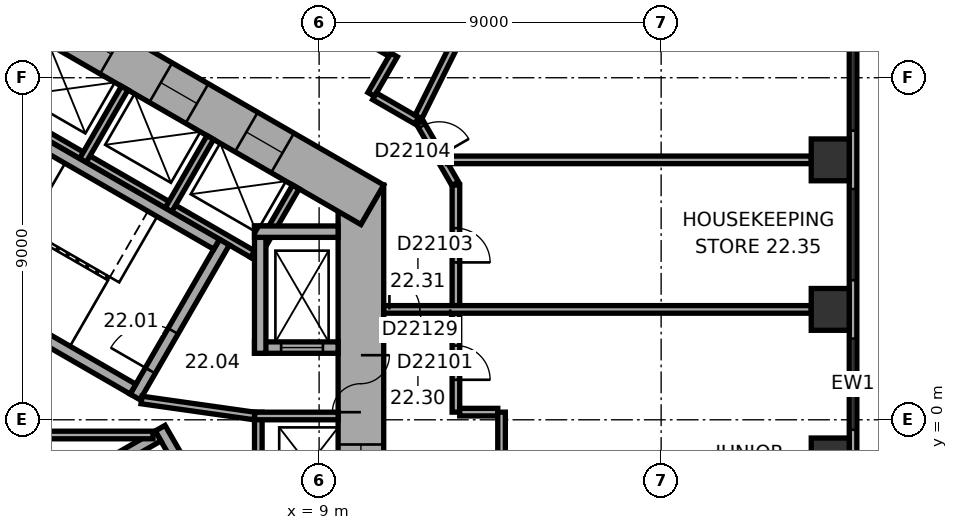
"""IFC4 building model, lengths in metres.
Left out: names, types, materials, properties, quantities, classifications, styles, units other than length and angle.
Written with IfcOpenShell. Run it as: python <this file> out.ifc"""

import sys

from ifc_helpers import new_model, si_unit, direction, frame, frame_2d, origin, origin_2d, place, context, subcontext, project, spatial, rectangle, extrude, element, fill, save


model = new_model("IFC4")
c1 = context("Model", 3, precision=1e-05, world=origin(), true_north=direction((0.0, 1.0)))
c2 = subcontext(c1, "Body", "Model", "MODEL_VIEW")
j1 = project(units=[si_unit("LENGTHUNIT", "METRE"), si_unit("PLANEANGLEUNIT", "RADIAN")], contexts=[c1])
p1 = place(None, origin())
s1 = spatial("IfcSite", under=j1, at=p1, CompositionType="ELEMENT")
p2 = place(p1, origin())
s2 = spatial("IfcBuilding", under=s1, at=p2, CompositionType="ELEMENT")
p3 = place(p2, frame((0.0, 0.0, 96.8)))
s3 = spatial("IfcBuildingStorey", under=s2, at=p3, CompositionType="ELEMENT", Elevation=96.8)
for number, where, z_axis, x_axis in (
    (1, (22.45, -1.03, 0.0), (0.0, 0.0, 1.0), (0.0, 1.0, 0.0)),
    (2, (22.45, 2.905, 0.0), (0.0, 0.0, 1.0), (0.0, 1.0, 0.0)),
    (3, (22.45, 6.839, 0.0), (0.0, 0.0, 1.0), (0.0, 1.0, 0.0)),
):
    element("IfcColumn", number, at=place(p3, frame(where, z_axis=z_axis, x_axis=x_axis)), inside=s3, PredefinedType="COLUMN", context=c2, shape_type="SweptSolid", body=[
        extrude(rectangle(XDim=1.1, YDim=1.0, at=origin_2d()), origin(), (0.0, 0.0, 1.0), 3.3),
    ])
p4 = place(p3, frame((10.1, -6.177, 0.0), z_axis=(0.0, 0.0, 1.0), x_axis=(0.0, 1.0, 0.0)))
e4 = element("IfcWall", 4, at=p4, inside=s3, PredefinedType="SHEAR", context=c2, shape_type="SweptSolid", body=[
    extrude(rectangle(XDim=12.355, YDim=1.2, at=frame_2d((6.177, 0.0))), origin(), (0.0, 0.0, 1.0), 3.3),
])
p5 = place(p4, frame((6.378, 0.0, 0.0)))
e5 = element("IfcOpeningElement", 5, at=p5, cuts=e4, PredefinedType="OPENING", context=c2, shape_type="SweptSolid", body=[
    extrude(rectangle(XDim=1.5, YDim=2.1, at=frame_2d((0.75, 1.05))), frame((0.0, 0.61, 0.0), z_axis=(0.0, -1.0, 0.0), x_axis=(1.0, 0.0, 0.0)), (0.0, 0.0, 1.0), 1.22),
])
p6 = place(p4, frame((1.828, 0.0, 0.0)))
e6 = element("IfcOpeningElement", 6, at=p6, cuts=e4, PredefinedType="OPENING", context=c2, shape_type="SweptSolid", body=[
    extrude(rectangle(XDim=1.1, YDim=2.1, at=frame_2d((0.55, 1.05))), frame((0.0, 0.61, 0.0), z_axis=(0.0, -1.0, 0.0), x_axis=(1.0, 0.0, 0.0)), (0.0, 0.0, 1.0), 1.22),
])
p7 = place(p4, frame((4.427, 0.0, 0.0)))
e7 = element("IfcOpeningElement", 7, at=p7, cuts=e4, PredefinedType="OPENING", context=c2, shape_type="SweptSolid", body=[
    extrude(rectangle(XDim=1.1, YDim=2.1, at=frame_2d((0.55, 1.05))), frame((0.0, 0.61, 0.0), z_axis=(0.0, -1.0, 0.0), x_axis=(1.0, 0.0, 0.0)), (0.0, 0.0, 1.0), 1.22),
])
p8 = place(p3, frame((10.4, 5.658, 0.0), z_axis=(0.0, 0.0, 1.0), x_axis=(-0.866021384402, 0.500006961711, 0.0)))
e8 = element("IfcWall", 8, at=p8, inside=s3, PredefinedType="SHEAR", context=c2, shape_type="SweptSolid", body=[
    extrude(rectangle(XDim=12.355, YDim=1.2, at=frame_2d((6.178, 0.0))), origin(), (0.0, 0.0, 1.0), 3.3),
])
p9 = place(p8, frame((2.728, 0.0, 0.0)))
e9 = element("IfcOpeningElement", 9, at=p9, cuts=e8, PredefinedType="OPENING", context=c2, shape_type="SweptSolid", body=[
    extrude(rectangle(XDim=1.1, YDim=2.1, at=frame_2d((0.55, 1.05))), frame((0.0, 0.61, 0.0), z_axis=(0.0, -1.0, 0.0), x_axis=(1.0, 0.0, 0.0)), (0.0, 0.0, 1.0), 1.22),
])
p10 = place(p8, frame((5.328, 0.0, 0.0)))
e10 = element("IfcOpeningElement", 10, at=p10, cuts=e8, PredefinedType="OPENING", context=c2, shape_type="SweptSolid", body=[
    extrude(rectangle(XDim=1.1, YDim=2.1, at=frame_2d((0.55, 1.05))), frame((0.0, 0.61, 0.0), z_axis=(0.0, -1.0, 0.0), x_axis=(1.0, 0.0, 0.0)), (0.0, 0.0, 1.0), 1.22),
])
p11 = place(p8, frame((7.928, 0.0, 0.0)))
e11 = element("IfcOpeningElement", 11, at=p11, cuts=e8, PredefinedType="OPENING", context=c2, shape_type="SweptSolid", body=[
    extrude(rectangle(XDim=1.1, YDim=2.1, at=frame_2d((0.55, 1.05))), frame((0.0, 0.61, 0.0), z_axis=(0.0, -1.0, 0.0), x_axis=(1.0, 0.0, 0.0)), (0.0, 0.0, 1.0), 1.22),
])
p12 = place(p3, frame((23.05, -9.687, 0.0), z_axis=(0.0, 0.0, 1.0), x_axis=(0.0, 1.0, 0.0)))
e12 = element("IfcWall", 12, at=p12, inside=s3, PredefinedType="STANDARD", context=c2, shape_type="SweptSolid", body=[
    extrude(rectangle(XDim=21.246, YDim=0.2, at=frame_2d((10.623, 0.0))), origin(), (0.0, 0.0, 1.0), 3.3),
])
p13 = place(p12, frame((1.555, 0.0, 0.8)))
e13 = element("IfcOpeningElement", 13, at=p13, cuts=e12, PredefinedType="OPENING", context=c2, shape_type="SweptSolid", body=[
    extrude(rectangle(XDim=2.4, YDim=1.7, at=frame_2d((1.2, 0.85))), frame((0.0, 0.11, 0.0), z_axis=(0.0, -1.0, 0.0), x_axis=(1.0, 0.0, 0.0)), (0.0, 0.0, 1.0), 0.22),
])
p14 = place(p12, frame((5.489, 0.0, 0.8)))
e14 = element("IfcOpeningElement", 14, at=p14, cuts=e12, PredefinedType="OPENING", context=c2, shape_type="SweptSolid", body=[
    extrude(rectangle(XDim=2.4, YDim=1.7, at=frame_2d((1.2, 0.85))), frame((0.0, 0.11, 0.0), z_axis=(0.0, -1.0, 0.0), x_axis=(1.0, 0.0, 0.0)), (0.0, 0.0, 1.0), 0.22),
])
p15 = place(p12, frame((9.424, 0.0, 0.8)))
e15 = element("IfcOpeningElement", 15, at=p15, cuts=e12, PredefinedType="OPENING", context=c2, shape_type="SweptSolid", body=[
    extrude(rectangle(XDim=2.4, YDim=1.7, at=frame_2d((1.2, 0.85))), frame((0.0, 0.11, 0.0), z_axis=(0.0, -1.0, 0.0), x_axis=(1.0, 0.0, 0.0)), (0.0, 0.0, 1.0), 0.22),
])
p16 = place(p12, frame((13.358, 0.0, 0.8)))
e16 = element("IfcOpeningElement", 16, at=p16, cuts=e12, PredefinedType="OPENING", context=c2, shape_type="SweptSolid", body=[
    extrude(rectangle(XDim=2.4, YDim=1.7, at=frame_2d((1.2, 0.85))), frame((0.0, 0.11, 0.0), z_axis=(0.0, -1.0, 0.0), x_axis=(1.0, 0.0, 0.0)), (0.0, 0.0, 1.0), 0.22),
])
p17 = place(p12, frame((17.293, 0.0, 0.8)))
e17 = element("IfcOpeningElement", 17, at=p17, cuts=e12, PredefinedType="OPENING", context=c2, shape_type="SweptSolid", body=[
    extrude(rectangle(XDim=2.4, YDim=1.7, at=frame_2d((1.2, 0.85))), frame((0.0, 0.11, 0.0), z_axis=(0.0, -1.0, 0.0), x_axis=(1.0, 0.0, 0.0)), (0.0, 0.0, 1.0), 0.22),
])
p18 = place(p3, frame((7.4, -5.2, 0.0), z_axis=(0.0, 0.0, 1.0), x_axis=(0.0, 1.0, 0.0)))
e18 = element("IfcWall", 18, at=p18, inside=s3, PredefinedType="PARTITIONING", context=c2, shape_type="SweptSolid", body=[
    extrude(rectangle(XDim=5.4, YDim=0.2, at=frame_2d((2.7, 0.0))), origin(), (0.0, 0.0, 1.0), 3.05),
])
p19 = place(p3, frame((7.3, 0.1, 0.0), z_axis=(0.0, 0.0, 1.0), x_axis=(1.0, 0.0, 0.0)))
e19 = element("IfcWall", 19, at=p19, inside=s3, PredefinedType="PARTITIONING", context=c2, shape_type="SweptSolid", body=[
    extrude(rectangle(XDim=2.2, YDim=0.2, at=frame_2d((1.1, 0.0))), origin(), (0.0, 0.0, 1.0), 3.05),
])
p20 = place(p3, frame((7.424, 4.259, 0.0), z_axis=(0.0, 0.0, 1.0), x_axis=(-0.866026010844, 0.49999894854, 0.0)))
e20 = element("IfcWall", 20, at=p20, inside=s3, PredefinedType="PARTITIONING", context=c2, shape_type="SweptSolid", body=[
    extrude(rectangle(XDim=8.0, YDim=0.2, at=frame_2d((4.0, 0.0))), origin(), (0.0, 0.0, 1.0), 3.05),
])
for number, where, z_axis, x_axis in (
    (21, (7.287, 4.222, 0.0), (0.0, 0.0, 1.0), (0.5, 0.866, 0.0)),
    (22, (5.036, 5.522, 0.0), (0.0, 0.0, 1.0), (0.5, 0.866, 0.0)),
    (23, (2.784, 6.822, 0.0), (0.0, 0.0, 1.0), (0.5, 0.866, 0.0)),
):
    element("IfcWall", number, at=place(p3, frame(where, z_axis=z_axis, x_axis=x_axis)), inside=s3, PredefinedType="PARTITIONING", context=c2, shape_type="SweptSolid", body=[
        extrude(rectangle(XDim=2.2, YDim=0.2, at=frame_2d((1.1, 0.0))), origin(), (0.0, 0.0, 1.0), 3.05),
    ])
p21 = place(p3, frame((4.158, 0.602, 0.0), z_axis=(0.0, 0.0, 1.0), x_axis=(0.499977259774, 0.866038532462, 0.0)))
e24 = element("IfcWall", 24, at=p21, inside=s3, PredefinedType="SHEAR", context=c2, shape_type="SweptSolid", body=[
    extrude(rectangle(XDim=4.7, YDim=0.3, at=frame_2d((2.35, 0.0))), origin(), (0.0, 0.0, 1.0), 3.05),
])
p22 = place(p21, frame((0.8, 0.0, 0.0)))
e25 = element("IfcOpeningElement", 25, at=p22, cuts=e24, PredefinedType="OPENING", context=c2, shape_type="SweptSolid", body=[
    extrude(rectangle(XDim=1.2, YDim=2.1, at=frame_2d((0.6, 1.05))), frame((0.0, 0.16, 0.0), z_axis=(0.0, -1.0, 0.0), x_axis=(1.0, 0.0, 0.0)), (0.0, 0.0, 1.0), 0.32),
])
for number, where, z_axis, x_axis in (
    (26, (4.103, 0.807, 0.0), (0.0, 0.0, 1.0), (-0.866, 0.5, 0.0)),
    (27, (6.303, 4.617, 0.0), (0.0, 0.0, 1.0), (-0.866, 0.5, 0.0)),
):
    element("IfcWall", number, at=place(p3, frame(where, z_axis=z_axis, x_axis=x_axis)), inside=s3, PredefinedType="SHEAR", context=c2, shape_type="SweptSolid", body=[
        extrude(rectangle(XDim=7.06, YDim=0.3, at=frame_2d((3.53, 0.0))), origin(), (0.0, 0.0, 1.0), 3.05),
    ])
p23 = place(p3, frame((4.816, -0.222, 0.0), z_axis=(0.0, 0.0, 1.0), x_axis=(0.499977259774, -0.866038532462, 0.0)))
e28 = element("IfcWall", 28, at=p23, inside=s3, PredefinedType="SHEAR", context=c2, shape_type="SweptSolid", body=[
    extrude(rectangle(XDim=4.7, YDim=0.3, at=frame_2d((2.35, 0.0))), origin(), (0.0, 0.0, 1.0), 3.05),
])
p24 = place(p3, frame((-1.353, -3.957, 0.0), z_axis=(0.0, 0.0, 1.0), x_axis=(0.866027801685, 0.499995846692, 0.0)))
e29 = element("IfcWall", 29, at=p24, inside=s3, PredefinedType="SHEAR", context=c2, shape_type="SweptSolid", body=[
    extrude(rectangle(XDim=7.06, YDim=0.3, at=frame_2d((3.53, 0.0))), origin(), (0.0, 0.0, 1.0), 3.05),
])
p25 = place(p3, frame((7.3, 1.9, 0.0), z_axis=(0.0, 0.0, 1.0), x_axis=(1.0, 0.0, 0.0)))
e30 = element("IfcWall", 30, at=p25, inside=s3, PredefinedType="SHEAR", context=c2, shape_type="SweptSolid", body=[
    extrude(rectangle(XDim=2.2, YDim=0.3, at=frame_2d((1.1, 0.0))), origin(), (0.0, 0.0, 1.0), 3.05),
])
p26 = place(p25, frame((0.7, 0.0, 0.0)))
e31 = element("IfcOpeningElement", 31, at=p26, cuts=e30, PredefinedType="OPENING", context=c2, shape_type="SweptSolid", body=[
    extrude(rectangle(XDim=1.1, YDim=2.1, at=frame_2d((0.55, 1.05))), frame((0.0, 0.16, 0.0), z_axis=(0.0, -1.0, 0.0), x_axis=(1.0, 0.0, 0.0)), (0.0, 0.0, 1.0), 0.32),
])
p27 = place(p3, frame((7.45, 1.75, 0.0), z_axis=(0.0, 0.0, 1.0), x_axis=(0.0, 1.0, 0.0)))
e32 = element("IfcWall", 32, at=p27, inside=s3, PredefinedType="SHEAR", context=c2, shape_type="SweptSolid", body=[
    extrude(rectangle(XDim=3.35, YDim=0.3, at=frame_2d((1.675, 0.0))), origin(), (0.0, 0.0, 1.0), 3.05),
])
p28 = place(p3, frame((7.3, 4.95, 0.0), z_axis=(0.0, 0.0, 1.0), x_axis=(1.0, 0.0, 0.0)))
e33 = element("IfcWall", 33, at=p28, inside=s3, PredefinedType="SHEAR", context=c2, shape_type="SweptSolid", body=[
    extrude(rectangle(XDim=2.2, YDim=0.3, at=frame_2d((1.1, 0.0))), origin(), (0.0, 0.0, 1.0), 3.05),
])
p29 = place(p3, frame((4.327, 0.521, 0.0), z_axis=(0.0, 0.0, 1.0), x_axis=(0.990124376366, -0.14019172346, 0.0)))
e34 = element("IfcWall", 34, at=p29, inside=s3, PredefinedType="PARTITIONING", context=c2, shape_type="SweptSolid", body=[
    extrude(rectangle(XDim=3.002, YDim=0.2, at=frame_2d((1.501, 0.0))), origin(), (0.0, 0.0, 1.0), 3.05),
])
p30 = place(p3, frame((-2.72, -0.4, 0.0), z_axis=(0.0, 0.0, 1.0), x_axis=(1.0, 0.0, 0.0)))
e35 = element("IfcWall", 35, at=p30, inside=s3, PredefinedType="PARTITIONING", context=c2, shape_type="SweptSolid", body=[
    extrude(rectangle(XDim=7.347, YDim=0.2, at=frame_2d((3.674, 0.0))), origin(), (0.0, 0.0, 1.0), 3.05),
])
p31 = place(p3, frame((10.371, 8.561, 0.0), z_axis=(0.0, 0.0, 1.0), x_axis=(0.499986357472, 0.866033280158, 0.0)))
e36 = element("IfcWall", 36, at=p31, inside=s3, PredefinedType="PARTITIONING", context=c2, shape_type="SweptSolid", body=[
    extrude(rectangle(XDim=1.201, YDim=0.2, at=frame_2d((0.601, 0.0))), origin(), (0.0, 0.0, 1.0), 3.05),
])
p32 = place(p3, frame((10.885, 9.652, 0.0), z_axis=(0.0, 0.0, 1.0), x_axis=(-0.866033630405, 0.499985750804, 0.0)))
e37 = element("IfcWall", 37, at=p32, inside=s3, PredefinedType="PARTITIONING", context=c2, shape_type="SweptSolid", body=[
    extrude(rectangle(XDim=8.642, YDim=0.2, at=frame_2d((4.321, 0.0))), origin(), (0.0, 0.0, 1.0), 3.05),
])
p33 = place(p32, frame((2.276, 0.0, 0.0)))
e38 = element("IfcOpeningElement", 38, at=p33, cuts=e37, PredefinedType="OPENING", context=c2, shape_type="SweptSolid", body=[
    extrude(rectangle(XDim=0.9, YDim=2.1, at=frame_2d((0.45, 1.05))), frame((0.0, 0.11, 0.0), z_axis=(0.0, -1.0, 0.0), x_axis=(1.0, 0.0, 0.0)), (0.0, 0.0, 1.0), 0.22),
])
p34 = place(p3, frame((11.566, 7.871, 0.0), z_axis=(0.0, 0.0, 1.0), x_axis=(-0.866004557827, 0.500036104519, 0.0)))
e39 = element("IfcWall", 39, at=p34, inside=s3, PredefinedType="PARTITIONING", context=c2, shape_type="SweptSolid", body=[
    extrude(rectangle(XDim=1.28, YDim=0.2, at=frame_2d((0.64, 0.0))), origin(), (0.0, 0.0, 1.0), 3.05),
])
p35 = place(p3, frame((12.58, 6.212, 0.0), z_axis=(0.0, 0.0, 1.0), x_axis=(-0.500063286585, 0.865988862174, 0.0)))
e40 = element("IfcWall", 40, at=p35, inside=s3, PredefinedType="PARTITIONING", context=c2, shape_type="SweptSolid", body=[
    extrude(rectangle(XDim=1.86, YDim=0.2, at=frame_2d((0.93, 0.0))), origin(), (0.0, 0.0, 1.0), 3.05),
])
p36 = place(p35, frame((0.842, 0.0, 0.0)))
e41 = element("IfcOpeningElement", 41, at=p36, cuts=e40, PredefinedType="OPENING", context=c2, shape_type="SweptSolid", body=[
    extrude(rectangle(XDim=0.9, YDim=2.1, at=frame_2d((0.45, 1.05))), frame((0.0, 0.11, 0.0), z_axis=(0.0, -1.0, 0.0), x_axis=(1.0, 0.0, 0.0)), (0.0, 0.0, 1.0), 0.22),
])
p37 = place(p3, frame((12.6, 0.201, 0.0), z_axis=(0.0, 0.0, 1.0), x_axis=(0.0, 1.0, 0.0)))
e42 = element("IfcWall", 42, at=p37, inside=s3, PredefinedType="PARTITIONING", context=c2, shape_type="SweptSolid", body=[
    extrude(rectangle(XDim=2.604, YDim=0.2, at=frame_2d((1.302, 0.0))), origin(), (0.0, 0.0, 1.0), 3.05),
])
p38 = place(p37, frame((0.852, 0.0, 0.0)))
e43 = element("IfcOpeningElement", 43, at=p38, cuts=e42, PredefinedType="OPENING", context=c2, shape_type="SweptSolid", body=[
    extrude(rectangle(XDim=0.9, YDim=2.1, at=frame_2d((0.45, 1.05))), frame((0.0, 0.11, 0.0), z_axis=(0.0, -1.0, 0.0), x_axis=(1.0, 0.0, 0.0)), (0.0, 0.0, 1.0), 0.22),
])
p39 = place(p3, frame((12.6, 3.004, 0.0), z_axis=(0.0, 0.0, 1.0), x_axis=(0.0, 1.0, 0.0)))
e44 = element("IfcWall", 44, at=p39, inside=s3, PredefinedType="PARTITIONING", context=c2, shape_type="SweptSolid", body=[
    extrude(rectangle(XDim=3.173, YDim=0.2, at=frame_2d((1.586, 0.0))), origin(), (0.0, 0.0, 1.0), 3.05),
])
p40 = place(p39, frame((1.136, 0.0, 0.0)))
e45 = element("IfcOpeningElement", 45, at=p40, cuts=e44, PredefinedType="OPENING", context=c2, shape_type="SweptSolid", body=[
    extrude(rectangle(XDim=0.9, YDim=2.1, at=frame_2d((0.45, 1.05))), frame((0.0, 0.11, 0.0), z_axis=(0.0, -1.0, 0.0), x_axis=(1.0, 0.0, 0.0)), (0.0, 0.0, 1.0), 0.22),
])
p41 = place(p3, frame((13.701, 0.201, 0.0), z_axis=(0.0, 0.0, 1.0), x_axis=(-1.0, 0.0, 0.0)))
e46 = element("IfcWall", 46, at=p41, inside=s3, PredefinedType="PARTITIONING", context=c2, shape_type="SweptSolid", body=[
    extrude(rectangle(XDim=1.001, YDim=0.2, at=frame_2d((0.5, 0.0))), origin(), (0.0, 0.0, 1.0), 3.05),
])
p42 = place(p3, frame((13.801, -5.501, 0.0), z_axis=(0.0, 0.0, 1.0), x_axis=(0.0, 1.0, 0.0)))
e47 = element("IfcWall", 47, at=p42, inside=s3, PredefinedType="PARTITIONING", context=c2, shape_type="SweptSolid", body=[
    extrude(rectangle(XDim=5.702, YDim=0.2, at=frame_2d((2.851, 0.0))), origin(), (0.0, 0.0, 1.0), 3.05),
])
p43 = place(p3, frame((15.915, 16.592, 0.0), z_axis=(0.0, 0.0, 1.0), x_axis=(-0.446199736347, -0.894933402709, 0.0)))
e48 = element("IfcWall", 48, at=p43, inside=s3, PredefinedType="PARTITIONING", context=c2, shape_type="SweptSolid", body=[
    extrude(rectangle(XDim=9.635, YDim=0.2, at=frame_2d((4.817, 0.0))), origin(), (0.0, 0.0, 1.0), 3.05),
])
p44 = place(p3, frame((21.95, 2.905, 0.0), z_axis=(0.0, 0.0, 1.0), x_axis=(-1.0, 0.0, 0.0)))
e49 = element("IfcWall", 49, at=p44, inside=s3, PredefinedType="PARTITIONING", context=c2, shape_type="SweptSolid", body=[
    extrude(rectangle(XDim=11.25, YDim=0.2, at=frame_2d((5.625, 0.0))), origin(), (0.0, 0.0, 1.0), 3.05),
])
p45 = place(p44, frame((9.5, 0.0, 0.0)))
e50 = element("IfcOpeningElement", 50, at=p45, cuts=e49, PredefinedType="OPENING", context=c2, shape_type="SweptSolid", body=[
    extrude(rectangle(XDim=1.6, YDim=2.1, at=frame_2d((0.8, 1.05))), frame((0.0, 0.11, 0.0), z_axis=(0.0, -1.0, 0.0), x_axis=(1.0, 0.0, 0.0)), (0.0, 0.0, 1.0), 0.22),
])
p46 = place(p3, frame((21.95, 6.839, 0.0), z_axis=(0.0, 0.0, 1.0), x_axis=(-1.0, 0.0, 0.0)))
e51 = element("IfcWall", 51, at=p46, inside=s3, PredefinedType="PARTITIONING", context=c2, shape_type="SweptSolid", body=[
    extrude(rectangle(XDim=9.572, YDim=0.2, at=frame_2d((4.786, 0.0))), origin(), (0.0, 0.0, 1.0), 3.05),
])
p47 = place(p15, origin())
e52 = element("IfcWindow", 52, at=p47, inside=s3, PartitioningType="SINGLE_PANEL", PredefinedType="WINDOW", context=c2, shape_type="SweptSolid", body=[
    extrude(rectangle(XDim=2.4, YDim=1.7, at=frame_2d((1.2, 0.85))), frame((0.0, 0.03, 0.0), z_axis=(0.0, -1.0, 0.0), x_axis=(1.0, 0.0, 0.0)), (0.0, 0.0, 1.0), 0.06),
])
fill(e15, e52)
p48 = place(p16, origin())
e53 = element("IfcWindow", 53, at=p48, inside=s3, PartitioningType="SINGLE_PANEL", PredefinedType="WINDOW", context=c2, shape_type="SweptSolid", body=[
    extrude(rectangle(XDim=2.4, YDim=1.7, at=frame_2d((1.2, 0.85))), frame((0.0, 0.03, 0.0), z_axis=(0.0, -1.0, 0.0), x_axis=(1.0, 0.0, 0.0)), (0.0, 0.0, 1.0), 0.06),
])
fill(e16, e53)
p49 = place(p17, origin())
e54 = element("IfcWindow", 54, at=p49, inside=s3, PartitioningType="SINGLE_PANEL", PredefinedType="WINDOW", context=c2, shape_type="SweptSolid", body=[
    extrude(rectangle(XDim=2.4, YDim=1.7, at=frame_2d((1.2, 0.85))), frame((0.0, 0.03, 0.0), z_axis=(0.0, -1.0, 0.0), x_axis=(1.0, 0.0, 0.0)), (0.0, 0.0, 1.0), 0.06),
])
fill(e17, e54)
p50 = place(p5, origin())
e55 = element("IfcDoor", 55, at=p50, inside=s3, OperationType="DOUBLE_DOOR_SINGLE_SWING", PredefinedType="DOOR", context=c2, shape_type="SweptSolid", body=[
    extrude(rectangle(XDim=1.5, YDim=2.1, at=frame_2d((0.75, 1.05))), frame((0.0, 0.025, 0.0), z_axis=(0.0, -1.0, 0.0), x_axis=(1.0, 0.0, 0.0)), (0.0, 0.0, 1.0), 0.05),
])
fill(e5, e55)
p51 = place(p22, origin())
e56 = element("IfcDoor", 56, at=p51, inside=s3, OperationType="SINGLE_SWING_RIGHT", PredefinedType="DOOR", context=c2, shape_type="SweptSolid", body=[
    extrude(rectangle(XDim=1.2, YDim=2.1, at=frame_2d((0.6, 1.05))), frame((0.0, 0.025, 0.0), z_axis=(0.0, -1.0, 0.0), x_axis=(1.0, 0.0, 0.0)), (0.0, 0.0, 1.0), 0.05),
])
fill(e25, e56)
p52 = place(p26, origin())
e57 = element("IfcDoor", 57, at=p52, inside=s3, OperationType="DOUBLE_DOOR_SLIDING", PredefinedType="DOOR", context=c2, shape_type="SweptSolid", body=[
    extrude(rectangle(XDim=1.1, YDim=2.1, at=frame_2d((0.55, 1.05))), frame((0.0, 0.025, 0.0), z_axis=(0.0, -1.0, 0.0), x_axis=(1.0, 0.0, 0.0)), (0.0, 0.0, 1.0), 0.05),
])
fill(e31, e57)
p53 = place(p7, origin())
e58 = element("IfcDoor", 58, at=p53, inside=s3, OperationType="DOUBLE_DOOR_SLIDING", PredefinedType="DOOR", context=c2, shape_type="SweptSolid", body=[
    extrude(rectangle(XDim=1.1, YDim=2.1, at=frame_2d((0.55, 1.05))), frame((0.0, 0.025, 0.0), z_axis=(0.0, -1.0, 0.0), x_axis=(1.0, 0.0, 0.0)), (0.0, 0.0, 1.0), 0.05),
])
fill(e7, e58)
p54 = place(p9, origin())
e59 = element("IfcDoor", 59, at=p54, inside=s3, OperationType="DOUBLE_DOOR_SLIDING", PredefinedType="DOOR", context=c2, shape_type="SweptSolid", body=[
    extrude(rectangle(XDim=1.1, YDim=2.1, at=frame_2d((0.55, 1.05))), frame((0.0, 0.025, 0.0), z_axis=(0.0, -1.0, 0.0), x_axis=(1.0, 0.0, 0.0)), (0.0, 0.0, 1.0), 0.05),
])
fill(e9, e59)
p55 = place(p10, origin())
e60 = element("IfcDoor", 60, at=p55, inside=s3, OperationType="DOUBLE_DOOR_SLIDING", PredefinedType="DOOR", context=c2, shape_type="SweptSolid", body=[
    extrude(rectangle(XDim=1.1, YDim=2.1, at=frame_2d((0.55, 1.05))), frame((0.0, 0.025, 0.0), z_axis=(0.0, -1.0, 0.0), x_axis=(1.0, 0.0, 0.0)), (0.0, 0.0, 1.0), 0.05),
])
fill(e10, e60)
p56 = place(p11, origin())
e61 = element("IfcDoor", 61, at=p56, inside=s3, OperationType="DOUBLE_DOOR_SLIDING", PredefinedType="DOOR", context=c2, shape_type="SweptSolid", body=[
    extrude(rectangle(XDim=1.1, YDim=2.1, at=frame_2d((0.55, 1.05))), frame((0.0, 0.025, 0.0), z_axis=(0.0, -1.0, 0.0), x_axis=(1.0, 0.0, 0.0)), (0.0, 0.0, 1.0), 0.05),
])
fill(e11, e61)
p57 = place(p38, origin())
e62 = element("IfcDoor", 62, at=p57, inside=s3, OperationType="SINGLE_SWING_LEFT", PredefinedType="DOOR", context=c2, shape_type="SweptSolid", body=[
    extrude(rectangle(XDim=0.9, YDim=2.1, at=frame_2d((0.45, 1.05))), frame((0.0, 0.025, 0.0), z_axis=(0.0, -1.0, 0.0), x_axis=(1.0, 0.0, 0.0)), (0.0, 0.0, 1.0), 0.05),
])
fill(e43, e62)
p58 = place(p40, origin())
e63 = element("IfcDoor", 63, at=p58, inside=s3, OperationType="SINGLE_SWING_LEFT", PredefinedType="DOOR", context=c2, shape_type="SweptSolid", body=[
    extrude(rectangle(XDim=0.9, YDim=2.1, at=frame_2d((0.45, 1.05))), frame((0.0, 0.025, 0.0), z_axis=(0.0, -1.0, 0.0), x_axis=(1.0, 0.0, 0.0)), (0.0, 0.0, 1.0), 0.05),
])
fill(e45, e63)
p59 = place(p36, origin())
e64 = element("IfcDoor", 64, at=p59, inside=s3, OperationType="SINGLE_SWING_LEFT", PredefinedType="DOOR", context=c2, shape_type="SweptSolid", body=[
    extrude(rectangle(XDim=0.9, YDim=2.1, at=frame_2d((0.45, 1.05))), frame((0.0, 0.025, 0.0), z_axis=(0.0, -1.0, 0.0), x_axis=(1.0, 0.0, 0.0)), (0.0, 0.0, 1.0), 0.05),
])
fill(e41, e64)
p60 = place(p45, origin())
e65 = element("IfcDoor", 65, at=p60, inside=s3, OperationType="DOUBLE_DOOR_SINGLE_SWING", PredefinedType="DOOR", context=c2, shape_type="SweptSolid", body=[
    extrude(rectangle(XDim=1.6, YDim=2.1, at=frame_2d((0.8, 1.05))), frame((0.0, 0.025, 0.0), z_axis=(0.0, -1.0, 0.0), x_axis=(1.0, 0.0, 0.0)), (0.0, 0.0, 1.0), 0.05),
])
fill(e50, e65)
save(model, sys.argv[1])
